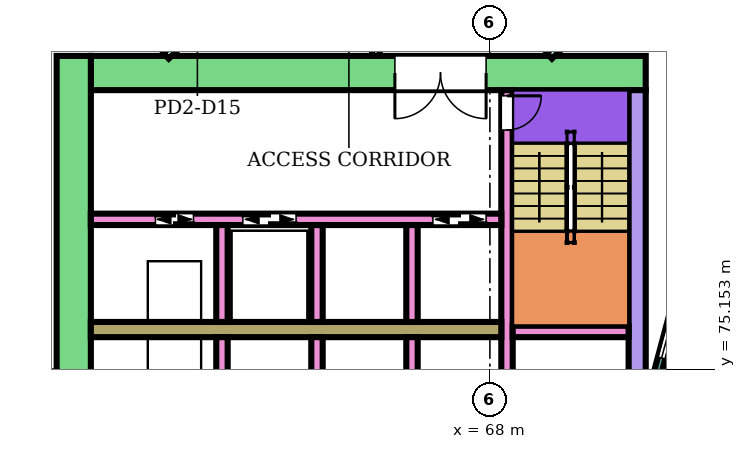
"""IFC4 building model, lengths in metres.
Left out: names, types, materials, properties, quantities, classifications, styles, units other than length and angle.
Written with IfcOpenShell. Run it as: python <this file> out.ifc"""

import sys

from ifc_helpers import new_model, si_unit, direction, frame, frame_2d, origin, place, context, subcontext, project, spatial, rectangle, extrude, element, fill, save


model = new_model("IFC4")
c1 = context("Model", 3, precision=1e-05, world=origin(), true_north=direction((0.0, 1.0)))
c2 = subcontext(c1, "Body", "Model", "MODEL_VIEW")
j1 = project(units=[si_unit("LENGTHUNIT", "METRE"), si_unit("PLANEANGLEUNIT", "RADIAN")], contexts=[c1])
p1 = place(None, origin())
s1 = spatial("IfcSite", under=j1, at=p1, CompositionType="ELEMENT")
p2 = place(p1, origin())
s2 = spatial("IfcBuilding", under=s1, at=p2, CompositionType="ELEMENT")
p3 = place(p2, frame((0.0, 0.0, 12.4)))
s3 = spatial("IfcBuildingStorey", under=s2, at=p3, CompositionType="ELEMENT", Elevation=12.4)
p4 = place(p3, frame((72.1, 82.95, 0.0), z_axis=(0.0, 0.0, 1.0), x_axis=(-1.0, 0.0, 0.0)))
e1 = element("IfcWall", 1, at=p4, inside=s3, PredefinedType="SHEAR", context=c2, shape_type="SweptSolid", body=[
    extrude(rectangle(XDim=14.6, YDim=0.9, at=frame_2d((7.3, 0.0))), origin(), (0.0, 0.0, 1.0), 4.95),
])
p5 = place(p4, frame((4.2, 0.0, 0.0)))
e2 = element("IfcOpeningElement", 2, at=p5, cuts=e1, PredefinedType="OPENING", context=c2, shape_type="SweptSolid", body=[
    extrude(rectangle(XDim=2.4, YDim=2.4, at=frame_2d((1.2, 1.2))), frame((0.0, 0.46, 0.0), z_axis=(0.0, -1.0, 0.0), x_axis=(1.0, 0.0, 0.0)), (0.0, 0.0, 1.0), 0.92),
])
p6 = place(p3, frame((71.875, 82.5, 0.0), z_axis=(0.0, 0.0, 1.0), x_axis=(0.0, -1.0, 0.0)))
e3 = element("IfcWall", 3, at=p6, inside=s3, PredefinedType="SHEAR", context=c2, shape_type="SweptSolid", body=[
    extrude(rectangle(XDim=7.5, YDim=0.45, at=frame_2d((3.75, 0.0))), origin(), (0.0, 0.0, 1.0), 4.95),
])
p7 = place(p3, frame((57.05, 83.4, 0.0), z_axis=(0.0, 0.0, 1.0), x_axis=(0.0, -1.0, 0.0)))
e4 = element("IfcWall", 4, at=p7, inside=s3, PredefinedType="SHEAR", context=c2, shape_type="SweptSolid", body=[
    extrude(rectangle(XDim=16.8, YDim=0.9, at=frame_2d((8.4, 0.0))), origin(), (0.0, 0.0, 1.0), 4.95),
])
p8 = place(p3, frame((68.45, 82.5, 0.0), z_axis=(0.0, 0.0, 1.0), x_axis=(0.0, -1.0, 0.0)))
e5 = element("IfcWall", 5, at=p8, inside=s3, PredefinedType="SHEAR", context=c2, shape_type="SweptSolid", body=[
    extrude(rectangle(XDim=7.5, YDim=0.3, at=frame_2d((3.75, 0.0))), origin(), (0.0, 0.0, 1.0), 4.95),
])
p9 = place(p8, frame((0.15, 0.0, 0.0)))
e6 = element("IfcOpeningElement", 6, at=p9, cuts=e5, PredefinedType="OPENING", context=c2, shape_type="SweptSolid", body=[
    extrude(rectangle(XDim=0.9, YDim=2.1, at=frame_2d((0.45, 1.05))), frame((0.0, 0.16, 0.0), z_axis=(0.0, -1.0, 0.0), x_axis=(1.0, 0.0, 0.0)), (0.0, 0.0, 1.0), 0.32),
])
p10 = place(p3, frame((71.65, 76.15, 0.0), z_axis=(0.0, 0.0, 1.0), x_axis=(-1.0, 0.0, 0.0)))
e7 = element("IfcWall", 7, at=p10, inside=s3, PredefinedType="SHEAR", context=c2, shape_type="SweptSolid", body=[
    extrude(rectangle(XDim=3.05, YDim=0.3, at=frame_2d((1.525, 0.0))), origin(), (0.0, 0.0, 1.0), 4.95),
])
p11 = place(p3, frame((68.3, 76.2, 0.0), z_axis=(0.0, 0.0, 1.0), x_axis=(-1.0, 0.0, 0.0)))
e8 = element("IfcWall", 8, at=p11, inside=s3, PredefinedType="SHEAR", context=c2, shape_type="SweptSolid", body=[
    extrude(rectangle(XDim=10.8, YDim=0.4, at=frame_2d((5.4, 0.0))), origin(), (0.0, 0.0, 1.0), 4.95),
])
p12 = place(p3, frame((68.3, 79.1, 0.0), z_axis=(0.0, 0.0, 1.0), x_axis=(-1.0, 0.0, 0.0)))
e9 = element("IfcWall", 9, at=p12, inside=s3, PredefinedType="SHEAR", context=c2, shape_type="SweptSolid", body=[
    extrude(rectangle(XDim=10.8, YDim=0.3, at=frame_2d((5.4, 0.0))), origin(), (0.0, 0.0, 1.0), 4.95),
])
p13 = place(p12, frame((0.4, 0.0, 0.0)))
e10 = element("IfcOpeningElement", 10, at=p13, cuts=e9, PredefinedType="OPENING", context=c2, shape_type="SweptSolid", body=[
    extrude(rectangle(XDim=1.4, YDim=2.1, at=frame_2d((0.7, 1.05))), frame((0.0, 0.16, 0.0), z_axis=(0.0, -1.0, 0.0), x_axis=(1.0, 0.0, 0.0)), (0.0, 0.0, 1.0), 0.32),
])
p14 = place(p12, frame((5.4, 0.0, 0.0)))
e11 = element("IfcOpeningElement", 11, at=p14, cuts=e9, PredefinedType="OPENING", context=c2, shape_type="SweptSolid", body=[
    extrude(rectangle(XDim=1.4, YDim=2.1, at=frame_2d((0.7, 1.05))), frame((0.0, 0.16, 0.0), z_axis=(0.0, -1.0, 0.0), x_axis=(1.0, 0.0, 0.0)), (0.0, 0.0, 1.0), 0.32),
])
p15 = place(p12, frame((8.1, 0.0, 0.0)))
e12 = element("IfcOpeningElement", 12, at=p15, cuts=e9, PredefinedType="OPENING", context=c2, shape_type="SweptSolid", body=[
    extrude(rectangle(XDim=1.0, YDim=2.1, at=frame_2d((0.5, 1.05))), frame((0.0, 0.16, 0.0), z_axis=(0.0, -1.0, 0.0), x_axis=(1.0, 0.0, 0.0)), (0.0, 0.0, 1.0), 0.32),
])
for number, where, z_axis, x_axis in (
    (13, (65.95, 76.0, 0.0), (0.0, 0.0, 1.0), (0.0, -1.0, 0.0)),
    (14, (63.45, 76.0, 0.0), (0.0, 0.0, 1.0), (0.0, -1.0, 0.0)),
    (15, (60.95, 76.0, 0.0), (0.0, 0.0, 1.0), (0.0, -1.0, 0.0)),
    (16, (65.95, 78.95, 0.0), (0.0, 0.0, 1.0), (0.0, -1.0, 0.0)),
    (17, (63.45, 78.95, 0.0), (0.0, 0.0, 1.0), (0.0, -1.0, 0.0)),
    (18, (60.95, 78.95, 0.0), (0.0, 0.0, 1.0), (0.0, -1.0, 0.0)),
):
    element("IfcWall", number, at=place(p3, frame(where, z_axis=z_axis, x_axis=x_axis)), inside=s3, PredefinedType="SHEAR", context=c2, shape_type="SweptSolid", body=[
        extrude(rectangle(XDim=2.55, YDim=0.3, at=frame_2d((1.275, 0.0))), origin(), (0.0, 0.0, 1.0), 4.95),
    ])
p16 = place(p3, frame((73.415, 78.802, 0.0), z_axis=(0.0, 0.0, 1.0), x_axis=(-0.258789828301, -0.965933654434, 0.0)))
e19 = element("IfcWall", 19, at=p16, inside=s3, PredefinedType="NOTDEFINED", context=c2, shape_type="SweptSolid", body=[
    extrude(rectangle(XDim=3.936, YDim=0.2, at=frame_2d((1.968, 0.0))), origin(), (0.0, 0.0, 1.0), 5.4),
])
p17 = place(p16, frame((0.468, 0.0, 0.9)))
e20 = element("IfcOpeningElement", 20, at=p17, cuts=e19, PredefinedType="OPENING", context=c2, shape_type="SweptSolid", body=[
    extrude(rectangle(XDim=3.0, YDim=2.3, at=frame_2d((1.5, 1.15))), frame((0.0, 0.11, 0.0), z_axis=(0.0, -1.0, 0.0), x_axis=(1.0, 0.0, 0.0)), (0.0, 0.0, 1.0), 0.22),
])
p18 = place(p3, frame((59.48, 83.4, 0.0), z_axis=(0.0, 0.0, 1.0), x_axis=(0.719688438314, 0.694297163869, 0.0)))
e21 = element("IfcWall", 21, at=p18, inside=s3, PredefinedType="PARTITIONING", context=c2, shape_type="SweptSolid", body=[
    extrude(rectangle(XDim=8.471, YDim=0.2, at=frame_2d((4.235, 0.0))), origin(), (0.0, 0.0, 1.0), 4.95),
])
p19 = place(p18, frame((7.204, 0.0, 0.0)))
e22 = element("IfcOpeningElement", 22, at=p19, cuts=e21, PredefinedType="OPENING", context=c2, shape_type="SweptSolid", body=[
    extrude(rectangle(XDim=0.9, YDim=2.1, at=frame_2d((0.45, 1.05))), frame((0.0, 0.11, 0.0), z_axis=(0.0, -1.0, 0.0), x_axis=(1.0, 0.0, 0.0)), (0.0, 0.0, 1.0), 0.22),
])
p20 = place(p18, frame((5.032, 0.0, 0.0)))
e23 = element("IfcOpeningElement", 23, at=p20, cuts=e21, PredefinedType="OPENING", context=c2, shape_type="SweptSolid", body=[
    extrude(rectangle(XDim=0.9, YDim=2.1, at=frame_2d((0.45, 1.05))), frame((0.0, 0.11, 0.0), z_axis=(0.0, -1.0, 0.0), x_axis=(1.0, 0.0, 0.0)), (0.0, 0.0, 1.0), 0.22),
])
p21 = place(p18, frame((2.787, 0.0, 0.0)))
e24 = element("IfcOpeningElement", 24, at=p21, cuts=e21, PredefinedType="OPENING", context=c2, shape_type="SweptSolid", body=[
    extrude(rectangle(XDim=0.9, YDim=2.1, at=frame_2d((0.45, 1.05))), frame((0.0, 0.11, 0.0), z_axis=(0.0, -1.0, 0.0), x_axis=(1.0, 0.0, 0.0)), (0.0, 0.0, 1.0), 0.22),
])
p22 = place(p18, frame((0.694, 0.0, 0.0)))
e25 = element("IfcOpeningElement", 25, at=p22, cuts=e21, PredefinedType="OPENING", context=c2, shape_type="SweptSolid", body=[
    extrude(rectangle(XDim=0.9, YDim=2.1, at=frame_2d((0.45, 1.05))), frame((0.0, 0.11, 0.0), z_axis=(0.0, -1.0, 0.0), x_axis=(1.0, 0.0, 0.0)), (0.0, 0.0, 1.0), 0.22),
])
p23 = place(p3, frame((65.0, 83.401, 0.0), z_axis=(0.0, 0.0, 1.0), x_axis=(0.0, 1.0, 0.0)))
e26 = element("IfcWall", 26, at=p23, inside=s3, PredefinedType="PARTITIONING", context=c2, shape_type="SweptSolid", body=[
    extrude(rectangle(XDim=1.399, YDim=0.2, at=frame_2d((0.7, 0.0))), origin(), (0.0, 0.0, 1.0), 4.95),
])
p24 = place(p3, frame((69.563, 83.4, 0.0), z_axis=(0.0, 0.0, 1.0), x_axis=(0.719454254864, 0.694539829785, 0.0)))
e27 = element("IfcWall", 27, at=p24, inside=s3, PredefinedType="PARTITIONING", context=c2, shape_type="SweptSolid", body=[
    extrude(rectangle(XDim=4.86, YDim=0.2, at=frame_2d((2.43, 0.0))), origin(), (0.0, 0.0, 1.0), 4.95),
])
p25 = place(p24, frame((2.035, 0.0, 0.0)))
e28 = element("IfcOpeningElement", 28, at=p25, cuts=e27, PredefinedType="OPENING", context=c2, shape_type="SweptSolid", body=[
    extrude(rectangle(XDim=0.9, YDim=2.1, at=frame_2d((0.45, 1.05))), frame((0.0, 0.11, 0.0), z_axis=(0.0, -1.0, 0.0), x_axis=(1.0, 0.0, 0.0)), (0.0, 0.0, 1.0), 0.22),
])
p26 = place(p17, origin())
e29 = element("IfcWindow", 29, at=p26, inside=s3, PartitioningType="SINGLE_PANEL", PredefinedType="WINDOW", context=c2, shape_type="SweptSolid", body=[
    extrude(rectangle(XDim=3.0, YDim=2.3, at=frame_2d((1.5, 1.15))), frame((0.0, 0.03, 0.0), z_axis=(0.0, -1.0, 0.0), x_axis=(1.0, 0.0, 0.0)), (0.0, 0.0, 1.0), 0.06),
])
fill(e20, e29)
p27 = place(p9, origin())
e30 = element("IfcDoor", 30, at=p27, inside=s3, OperationType="SINGLE_SWING_LEFT", PredefinedType="DOOR", context=c2, shape_type="SweptSolid", body=[
    extrude(rectangle(XDim=0.9, YDim=2.1, at=frame_2d((0.45, 1.05))), frame((0.0, 0.025, 0.0), z_axis=(0.0, -1.0, 0.0), x_axis=(1.0, 0.0, 0.0)), (0.0, 0.0, 1.0), 0.05),
])
fill(e6, e30)
p28 = place(p13, origin())
e31 = element("IfcDoor", 31, at=p28, inside=s3, OperationType="DOUBLE_DOOR_SLIDING", PredefinedType="DOOR", context=c2, shape_type="SweptSolid", body=[
    extrude(rectangle(XDim=1.4, YDim=2.1, at=frame_2d((0.7, 1.05))), frame((0.0, 0.025, 0.0), z_axis=(0.0, -1.0, 0.0), x_axis=(1.0, 0.0, 0.0)), (0.0, 0.0, 1.0), 0.05),
])
fill(e10, e31)
p29 = place(p14, origin())
e32 = element("IfcDoor", 32, at=p29, inside=s3, OperationType="DOUBLE_DOOR_SLIDING", PredefinedType="DOOR", context=c2, shape_type="SweptSolid", body=[
    extrude(rectangle(XDim=1.4, YDim=2.1, at=frame_2d((0.7, 1.05))), frame((0.0, 0.025, 0.0), z_axis=(0.0, -1.0, 0.0), x_axis=(1.0, 0.0, 0.0)), (0.0, 0.0, 1.0), 0.05),
])
fill(e11, e32)
p30 = place(p15, origin())
e33 = element("IfcDoor", 33, at=p30, inside=s3, OperationType="DOUBLE_DOOR_SLIDING", PredefinedType="DOOR", context=c2, shape_type="SweptSolid", body=[
    extrude(rectangle(XDim=1.0, YDim=2.1, at=frame_2d((0.5, 1.05))), frame((0.0, 0.025, 0.0), z_axis=(0.0, -1.0, 0.0), x_axis=(1.0, 0.0, 0.0)), (0.0, 0.0, 1.0), 0.05),
])
fill(e12, e33)
p31 = place(p5, origin())
e34 = element("IfcDoor", 34, at=p31, inside=s3, OperationType="DOUBLE_DOOR_SINGLE_SWING", PredefinedType="DOOR", context=c2, shape_type="SweptSolid", body=[
    extrude(rectangle(XDim=2.4, YDim=2.4, at=frame_2d((1.2, 1.2))), frame((0.0, 0.025, 0.0), z_axis=(0.0, -1.0, 0.0), x_axis=(1.0, 0.0, 0.0)), (0.0, 0.0, 1.0), 0.05),
])
fill(e2, e34)
save(model, sys.argv[1])
